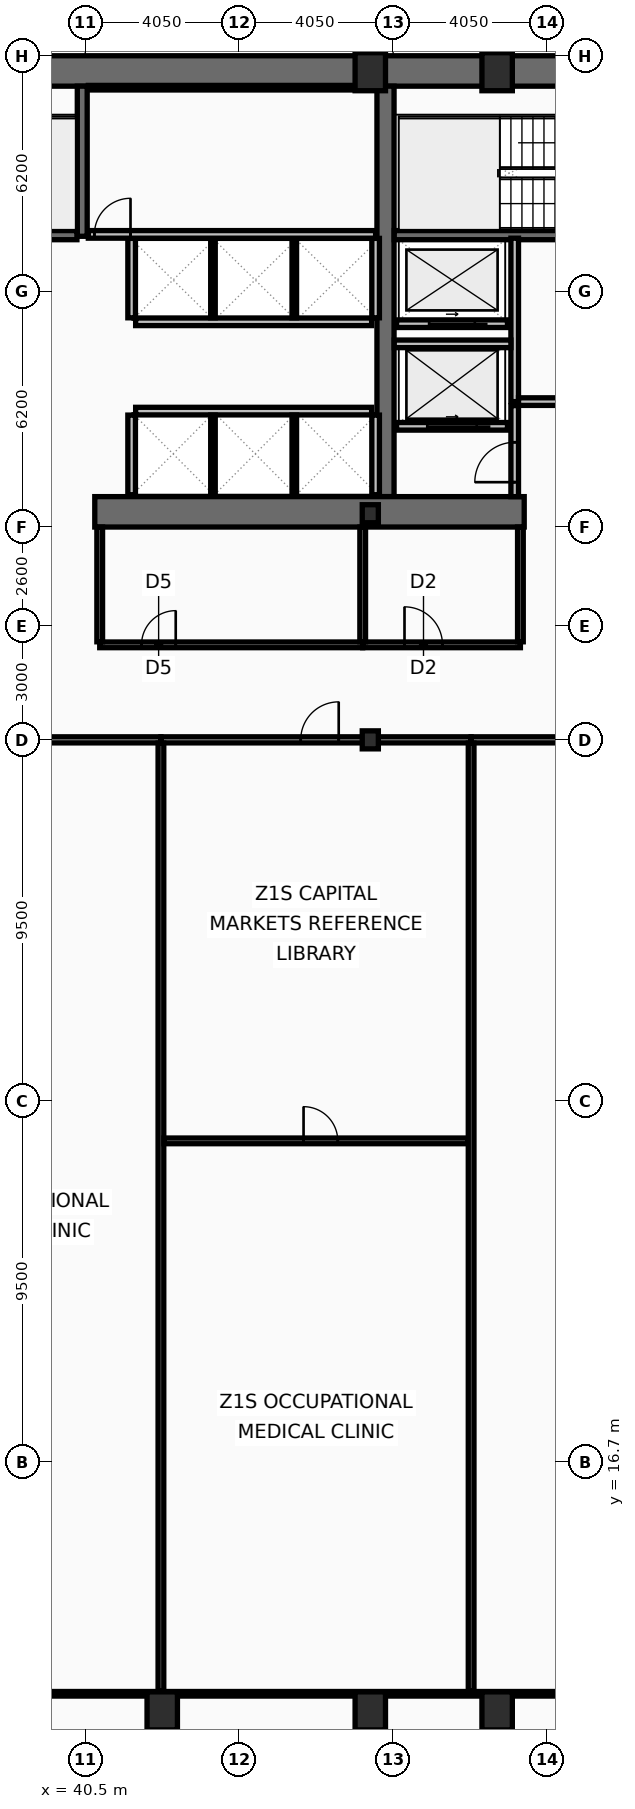
"""IFC4 building model, lengths in metres.
Left out: names, types, materials, properties, quantities, classifications, styles, units other than length and angle.
Written with IfcOpenShell. Run it as: python <this file> out.ifc"""

import sys

from ifc_helpers import new_model, si_unit, direction, frame, frame_2d, origin, origin_2d, place, context, subcontext, project, spatial, rectangle, hollow_rectangle, i_section, extrude, element, fill, save


model = new_model("IFC4")
c1 = context("Model", 3, precision=1e-05, world=origin(), true_north=direction((0.0, 1.0)))
c2 = subcontext(c1, "Body", "Model", "MODEL_VIEW")
j1 = project(units=[si_unit("LENGTHUNIT", "METRE"), si_unit("PLANEANGLEUNIT", "RADIAN")], contexts=[c1])
p1 = place(None, origin())
s1 = spatial("IfcSite", under=j1, at=p1, CompositionType="ELEMENT")
p2 = place(p1, origin())
s2 = spatial("IfcBuilding", under=s1, at=p2, CompositionType="ELEMENT")
p3 = place(p2, frame((0.0, 0.0, 65.8)))
s3 = spatial("IfcBuildingStorey", under=s2, at=p3, CompositionType="ELEMENT", Elevation=65.8)
p4 = place(p3, frame((16.2, 53.3, 0.0), z_axis=(0.0, 0.0, 1.0), x_axis=(1.0, 0.0, 0.0)))
e1 = element("IfcWall", 1, at=p4, inside=s3, PredefinedType="SHEAR", context=c2, shape_type="SweptSolid", body=[
    extrude(rectangle(XDim=40.5, YDim=0.8, at=frame_2d((20.25, 0.0))), origin(), (0.0, 0.0, 1.0), 3.82),
])
p5 = place(p3, frame((48.4, 42.1, 0.0), z_axis=(0.0, 0.0, 1.0), x_axis=(0.0, 1.0, 0.0)))
e2 = element("IfcWall", 2, at=p5, inside=s3, PredefinedType="SHEAR", context=c2, shape_type="SweptSolid", body=[
    extrude(rectangle(XDim=10.8, YDim=0.45, at=frame_2d((5.4, 0.0))), origin(), (0.0, 0.0, 1.0), 3.82),
])
p6 = place(p3, frame((52.05, 41.7, 0.0), z_axis=(0.0, 0.0, 1.0), x_axis=(-1.0, 0.0, 0.0)))
e3 = element("IfcWall", 3, at=p6, inside=s3, PredefinedType="SHEAR", context=c2, shape_type="SweptSolid", body=[
    extrude(rectangle(XDim=11.3, YDim=0.8, at=frame_2d((5.65, 0.0))), origin(), (0.0, 0.0, 1.0), 3.82),
])
p7 = place(p3, frame((40.42, 48.95, 0.0), z_axis=(0.0, 0.0, 1.0), x_axis=(0.0, 1.0, 0.0)))
e4 = element("IfcWall", 4, at=p7, inside=s3, PredefinedType="SHEAR", context=c2, shape_type="SweptSolid", body=[
    extrude(rectangle(XDim=3.95, YDim=0.26, at=frame_2d((1.975, 0.0))), origin(), (0.0, 0.0, 1.0), 3.82),
])
p8 = place(p3, frame((48.63, 48.98, 0.0), z_axis=(0.0, 0.0, 1.0), x_axis=(1.0, 0.0, 0.0)))
e5 = element("IfcWall", 5, at=p8, inside=s3, PredefinedType="SHEAR", context=c2, shape_type="SweptSolid", body=[
    extrude(rectangle(XDim=7.27, YDim=0.24, at=frame_2d((3.635, 0.0))), origin(), (0.0, 0.0, 1.0), 3.82),
])
p9 = place(p8, frame((6.0, 0.0, 0.0)))
e6 = element("IfcOpeningElement", 6, at=p9, cuts=e5, PredefinedType="OPENING", context=c2, shape_type="SweptSolid", body=[
    extrude(rectangle(XDim=1.05, YDim=2.15, at=frame_2d((0.525, 1.075))), frame((0.0, 0.13, 0.0), z_axis=(0.0, -1.0, 0.0), x_axis=(1.0, 0.0, 0.0)), (0.0, 0.0, 1.0), 0.26),
])
p10 = place(p3, frame((32.72, 48.98, 0.0), z_axis=(0.0, 0.0, 1.0), x_axis=(1.0, 0.0, 0.0)))
e7 = element("IfcWall", 7, at=p10, inside=s3, PredefinedType="SHEAR", context=c2, shape_type="SweptSolid", body=[
    extrude(rectangle(XDim=7.56, YDim=0.24, at=frame_2d((3.78, 0.0))), origin(), (0.0, 0.0, 1.0), 3.82),
])
p11 = place(p10, frame((0.22, 0.0, 0.0)))
e8 = element("IfcOpeningElement", 8, at=p11, cuts=e7, PredefinedType="OPENING", context=c2, shape_type="SweptSolid", body=[
    extrude(rectangle(XDim=1.05, YDim=2.15, at=frame_2d((0.525, 1.075))), frame((0.0, 0.13, 0.0), z_axis=(0.0, -1.0, 0.0), x_axis=(1.0, 0.0, 0.0)), (0.0, 0.0, 1.0), 0.26),
])
for number, where, z_axis, x_axis in (
    (9, (42.525, 10.15, 0.0), (0.0, 0.0, 1.0), (1.0, 0.0, 0.0)),
    (10, (48.0, 10.15, 0.0), (0.0, 0.0, 1.0), (1.0, 0.0, 0.0)),
    (11, (51.337, 10.15, 0.0), (0.0, 0.0, 1.0), (1.0, 0.0, 0.0)),
    (12, (48.0, 53.28, 0.0), (0.0, 0.0, 1.0), (1.0, 0.0, 0.0)),
    (13, (51.337, 53.28, 0.0), (0.0, 0.0, 1.0), (1.0, 0.0, 0.0)),
):
    element("IfcColumn", number, at=place(p3, frame(where, z_axis=z_axis, x_axis=x_axis)), inside=s3, PredefinedType="COLUMN", context=c2, shape_type="SweptSolid", body=[
        extrude(hollow_rectangle(XDim=0.8, YDim=1.0, WallThickness=0.055, at=origin_2d()), origin(), (0.0, 0.0, 1.0), 4.0),
    ])
for number, where, z_axis, x_axis in (
    (14, (48.0, 35.7, 0.0), (0.0, 0.0, 1.0), (1.0, 0.0, 0.0)),
    (15, (48.0, 41.65, 0.0), (0.0, 0.0, 1.0), (1.0, 0.0, 0.0)),
):
    element("IfcColumn", number, at=place(p3, frame(where, z_axis=z_axis, x_axis=x_axis)), inside=s3, PredefinedType="COLUMN", context=c2, shape_type="SweptSolid", body=[
        extrude(i_section(OverallWidth=0.424, OverallDepth=0.474, WebThickness=0.048, FlangeThickness=0.077, at=origin_2d()), origin(), (0.0, 0.0, 1.0), 4.0),
    ])
p12 = place(p3, frame((51.61, 43.95, 0.0), z_axis=(0.0, 0.0, 1.0), x_axis=(-1.0, 0.0, 0.0)))
e16 = element("IfcWall", 16, at=p12, inside=s3, PredefinedType="PARTITIONING", context=c2, shape_type="SweptSolid", body=[
    extrude(rectangle(XDim=2.92, YDim=0.2, at=frame_2d((1.46, 0.0))), origin(), (0.0, 0.0, 1.0), 3.82),
])
p13 = place(p12, frame((0.81, 0.0, 0.0)))
e17 = element("IfcOpeningElement", 17, at=p13, cuts=e16, PredefinedType="OPENING", context=c2, shape_type="SweptSolid", body=[
    extrude(rectangle(XDim=1.3, YDim=2.18, at=frame_2d((0.65, 1.09))), frame((0.0, 0.11, 0.0), z_axis=(0.0, -1.0, 0.0), x_axis=(1.0, 0.0, 0.0)), (0.0, 0.0, 1.0), 0.22),
])
p14 = place(p3, frame((51.61, 46.65, 0.0), z_axis=(0.0, 0.0, 1.0), x_axis=(-1.0, 0.0, 0.0)))
e18 = element("IfcWall", 18, at=p14, inside=s3, PredefinedType="PARTITIONING", context=c2, shape_type="SweptSolid", body=[
    extrude(rectangle(XDim=2.92, YDim=0.2, at=frame_2d((1.46, 0.0))), origin(), (0.0, 0.0, 1.0), 3.82),
])
p15 = place(p14, frame((0.86, 0.0, 0.0)))
e19 = element("IfcOpeningElement", 19, at=p15, cuts=e18, PredefinedType="OPENING", context=c2, shape_type="SweptSolid", body=[
    extrude(rectangle(XDim=1.2, YDim=2.18, at=frame_2d((0.6, 1.09))), frame((0.0, 0.11, 0.0), z_axis=(0.0, -1.0, 0.0), x_axis=(1.0, 0.0, 0.0)), (0.0, 0.0, 1.0), 0.22),
])
p16 = place(p3, frame((51.8, 44.6, 0.0), z_axis=(0.0, 0.0, 1.0), x_axis=(0.0, 1.0, 0.0)))
e20 = element("IfcWall", 20, at=p16, inside=s3, PredefinedType="PARTITIONING", context=c2, shape_type="SweptSolid", body=[
    extrude(rectangle(XDim=4.3, YDim=0.2, at=frame_2d((2.15, 0.0))), origin(), (0.0, 0.0, 1.0), 3.82),
])
p17 = place(p3, frame((51.9, 44.6, 0.0), z_axis=(0.0, 0.0, 1.0), x_axis=(1.0, 0.0, 0.0)))
e21 = element("IfcWall", 21, at=p17, inside=s3, PredefinedType="PARTITIONING", context=c2, shape_type="SweptSolid", body=[
    extrude(rectangle(XDim=4.0, YDim=0.2, at=frame_2d((2.0, 0.0))), origin(), (0.0, 0.0, 1.0), 3.82),
])
p18 = place(p17, frame((1.15, 0.0, 0.0)))
e22 = element("IfcOpeningElement", 22, at=p18, cuts=e21, PredefinedType="OPENING", context=c2, shape_type="SweptSolid", body=[
    extrude(rectangle(XDim=1.05, YDim=2.15, at=frame_2d((0.525, 1.075))), frame((0.0, 0.11, 0.0), z_axis=(0.0, -1.0, 0.0), x_axis=(1.0, 0.0, 0.0)), (0.0, 0.0, 1.0), 0.22),
])
p19 = place(p3, frame((48.63, 46.12, 0.0), z_axis=(0.0, 0.0, 1.0), x_axis=(1.0, 0.0, 0.0)))
e23 = element("IfcWall", 23, at=p19, inside=s3, PredefinedType="PARTITIONING", context=c2, shape_type="SweptSolid", body=[
    extrude(rectangle(XDim=3.07, YDim=0.2, at=frame_2d((1.535, 0.0))), origin(), (0.0, 0.0, 1.0), 3.82),
])
p20 = place(p3, frame((51.8, 42.1, 0.0), z_axis=(0.0, 0.0, 1.0), x_axis=(0.0, 1.0, 0.0)))
e24 = element("IfcWall", 24, at=p20, inside=s3, PredefinedType="PARTITIONING", context=c2, shape_type="SweptSolid", body=[
    extrude(rectangle(XDim=2.395, YDim=0.2, at=frame_2d((1.198, 0.0))), origin(), (0.0, 0.0, 1.0), 3.82),
])
p21 = place(p20, frame((0.38, 0.0, 0.0)))
e25 = element("IfcOpeningElement", 25, at=p21, cuts=e24, PredefinedType="OPENING", context=c2, shape_type="SweptSolid", body=[
    extrude(rectangle(XDim=1.05, YDim=2.15, at=frame_2d((0.525, 1.075))), frame((0.0, 0.11, 0.0), z_axis=(0.0, -1.0, 0.0), x_axis=(1.0, 0.0, 0.0)), (0.0, 0.0, 1.0), 0.22),
])
p22 = place(p3, frame((41.825, 46.7, 0.0), z_axis=(0.0, 0.0, 1.0), x_axis=(1.0, 0.0, 0.0)))
e26 = element("IfcWall", 26, at=p22, inside=s3, PredefinedType="PARTITIONING", context=c2, shape_type="SweptSolid", body=[
    extrude(rectangle(XDim=6.21, YDim=0.2, at=frame_2d((3.105, 0.0))), origin(), (0.0, 0.0, 1.0), 3.82),
])
for number, where, z_axis, x_axis in (
    (27, (41.72, 46.805, 0.0), (0.0, 0.0, 1.0), (0.0, 1.0, 0.0)),
    (28, (48.14, 46.805, 0.0), (0.0, 0.0, 1.0), (0.0, 1.0, 0.0)),
):
    element("IfcWall", number, at=place(p3, frame(where, z_axis=z_axis, x_axis=x_axis)), inside=s3, PredefinedType="PARTITIONING", context=c2, shape_type="SweptSolid", body=[
        extrude(rectangle(XDim=2.09, YDim=0.2, at=frame_2d((1.045, 0.0))), origin(), (0.0, 0.0, 1.0), 3.82),
    ])
for number, where, z_axis, x_axis in (
    (29, (43.86, 46.805, 0.0), (0.0, 0.0, 1.0), (0.0, 1.0, 0.0)),
    (30, (46.0, 46.805, 0.0), (0.0, 0.0, 1.0), (0.0, 1.0, 0.0)),
):
    element("IfcWall", number, at=place(p3, frame(where, z_axis=z_axis, x_axis=x_axis)), inside=s3, PredefinedType="PARTITIONING", context=c2, shape_type="SweptSolid", body=[
        extrude(rectangle(XDim=2.09, YDim=0.12, at=frame_2d((1.045, 0.0))), origin(), (0.0, 0.0, 1.0), 3.82),
    ])
p23 = place(p3, frame((41.825, 44.35, 0.0), z_axis=(0.0, 0.0, 1.0), x_axis=(1.0, 0.0, 0.0)))
e31 = element("IfcWall", 31, at=p23, inside=s3, PredefinedType="PARTITIONING", context=c2, shape_type="SweptSolid", body=[
    extrude(rectangle(XDim=6.21, YDim=0.2, at=frame_2d((3.105, 0.0))), origin(), (0.0, 0.0, 1.0), 3.82),
])
for number, where, z_axis, x_axis in (
    (32, (41.72, 42.15, 0.0), (0.0, 0.0, 1.0), (0.0, 1.0, 0.0)),
    (33, (48.14, 42.15, 0.0), (0.0, 0.0, 1.0), (0.0, 1.0, 0.0)),
):
    element("IfcWall", number, at=place(p3, frame(where, z_axis=z_axis, x_axis=x_axis)), inside=s3, PredefinedType="PARTITIONING", context=c2, shape_type="SweptSolid", body=[
        extrude(rectangle(XDim=2.095, YDim=0.2, at=frame_2d((1.048, 0.0))), origin(), (0.0, 0.0, 1.0), 3.82),
    ])
for number, where, z_axis, x_axis in (
    (34, (43.86, 42.15, 0.0), (0.0, 0.0, 1.0), (0.0, 1.0, 0.0)),
    (35, (46.0, 42.15, 0.0), (0.0, 0.0, 1.0), (0.0, 1.0, 0.0)),
):
    element("IfcWall", number, at=place(p3, frame(where, z_axis=z_axis, x_axis=x_axis)), inside=s3, PredefinedType="PARTITIONING", context=c2, shape_type="SweptSolid", body=[
        extrude(rectangle(XDim=2.095, YDim=0.12, at=frame_2d((1.048, 0.0))), origin(), (0.0, 0.0, 1.0), 3.82),
    ])
p24 = place(p3, frame((40.58, 52.86, 0.0), z_axis=(0.0, 0.0, 1.0), x_axis=(1.0, 0.0, 0.0)))
e36 = element("IfcWall", 36, at=p24, inside=s3, PredefinedType="PARTITIONING", context=c2, shape_type="SweptSolid", body=[
    extrude(rectangle(XDim=7.56, YDim=0.12, at=frame_2d((3.78, 0.0))), origin(), (0.0, 0.0, 1.0), 3.82),
])
p25 = place(p3, frame((40.58, 49.0, 0.0), z_axis=(0.0, 0.0, 1.0), x_axis=(1.0, 0.0, 0.0)))
e37 = element("IfcWall", 37, at=p25, inside=s3, PredefinedType="PARTITIONING", context=c2, shape_type="SweptSolid", body=[
    extrude(rectangle(XDim=7.56, YDim=0.2, at=frame_2d((3.78, 0.0))), origin(), (0.0, 0.0, 1.0), 3.82),
])
p26 = place(p25, frame((0.16, 0.0, 0.0)))
e38 = element("IfcOpeningElement", 38, at=p26, cuts=e37, PredefinedType="OPENING", context=c2, shape_type="SweptSolid", body=[
    extrude(rectangle(XDim=0.95, YDim=2.1, at=frame_2d((0.475, 1.05))), frame((0.0, 0.11, 0.0), z_axis=(0.0, -1.0, 0.0), x_axis=(1.0, 0.0, 0.0)), (0.0, 0.0, 1.0), 0.22),
])
p27 = place(p3, frame((40.88, 38.2, 0.0), z_axis=(0.0, 0.0, 1.0), x_axis=(1.0, 0.0, 0.0)))
e39 = element("IfcWall", 39, at=p27, inside=s3, PredefinedType="PARTITIONING", context=c2, shape_type="SweptSolid", body=[
    extrude(rectangle(XDim=6.92, YDim=0.15, at=frame_2d((3.46, 0.0))), origin(), (0.0, 0.0, 1.0), 3.01),
])
p28 = place(p27, frame((1.1, 0.0, 0.0)))
e40 = element("IfcOpeningElement", 40, at=p28, cuts=e39, PredefinedType="OPENING", context=c2, shape_type="SweptSolid", body=[
    extrude(rectangle(XDim=0.9, YDim=2.05, at=frame_2d((0.45, 1.025))), frame((0.0, 0.085, 0.0), z_axis=(0.0, -1.0, 0.0), x_axis=(1.0, 0.0, 0.0)), (0.0, 0.0, 1.0), 0.17),
])
p29 = place(p3, frame((47.8, 38.2, 0.0), z_axis=(0.0, 0.0, 1.0), x_axis=(1.0, 0.0, 0.0)))
e41 = element("IfcWall", 41, at=p29, inside=s3, PredefinedType="PARTITIONING", context=c2, shape_type="SweptSolid", body=[
    extrude(rectangle(XDim=4.15, YDim=0.15, at=frame_2d((2.075, 0.0))), origin(), (0.0, 0.0, 1.0), 3.01),
])
p30 = place(p29, frame((1.1, 0.0, 0.0)))
e42 = element("IfcOpeningElement", 42, at=p30, cuts=e41, PredefinedType="OPENING", context=c2, shape_type="SweptSolid", body=[
    extrude(rectangle(XDim=1.0, YDim=2.05, at=frame_2d((0.5, 1.025))), frame((0.0, 0.085, 0.0), z_axis=(0.0, -1.0, 0.0), x_axis=(1.0, 0.0, 0.0)), (0.0, 0.0, 1.0), 0.17),
])
p31 = place(p3, frame((40.88, 38.28, 0.0), z_axis=(0.0, 0.0, 1.0), x_axis=(0.0, 1.0, 0.0)))
e43 = element("IfcWall", 43, at=p31, inside=s3, PredefinedType="PARTITIONING", context=c2, shape_type="SweptSolid", body=[
    extrude(rectangle(XDim=3.02, YDim=0.15, at=frame_2d((1.51, 0.0))), origin(), (0.0, 0.0, 1.0), 3.82),
])
p32 = place(p3, frame((47.8, 38.28, 0.0), z_axis=(0.0, 0.0, 1.0), x_axis=(0.0, 1.0, 0.0)))
e44 = element("IfcWall", 44, at=p32, inside=s3, PredefinedType="PARTITIONING", context=c2, shape_type="SweptSolid", body=[
    extrude(rectangle(XDim=3.02, YDim=0.15, at=frame_2d((1.51, 0.0))), origin(), (0.0, 0.0, 1.0), 3.01),
])
p33 = place(p3, frame((51.95, 38.28, 0.0), z_axis=(0.0, 0.0, 1.0), x_axis=(0.0, 1.0, 0.0)))
e45 = element("IfcWall", 45, at=p33, inside=s3, PredefinedType="PARTITIONING", context=c2, shape_type="SweptSolid", body=[
    extrude(rectangle(XDim=3.02, YDim=0.15, at=frame_2d((1.51, 0.0))), origin(), (0.0, 0.0, 1.0), 3.82),
])
p34 = place(p3, frame((34.68, 35.7, 0.0), z_axis=(0.0, 0.0, 1.0), x_axis=(1.0, 0.0, 0.0)))
e46 = element("IfcWall", 46, at=p34, inside=s3, PredefinedType="PARTITIONING", context=c2, shape_type="SweptSolid", body=[
    extrude(rectangle(XDim=7.81, YDim=0.16, at=frame_2d((3.905, 0.0))), origin(), (0.0, 0.0, 1.0), 3.01),
])
p35 = place(p34, frame((3.53, 0.0, 0.0)))
e47 = element("IfcOpeningElement", 47, at=p35, cuts=e46, PredefinedType="OPENING", context=c2, shape_type="SweptSolid", body=[
    extrude(rectangle(XDim=1.0, YDim=2.05, at=frame_2d((0.5, 1.025))), frame((0.0, 0.09, 0.0), z_axis=(0.0, -1.0, 0.0), x_axis=(1.0, 0.0, 0.0)), (0.0, 0.0, 1.0), 0.18),
])
p36 = place(p3, frame((42.49, 35.7, 0.0), z_axis=(0.0, 0.0, 1.0), x_axis=(1.0, 0.0, 0.0)))
e48 = element("IfcWall", 48, at=p36, inside=s3, PredefinedType="PARTITIONING", context=c2, shape_type="SweptSolid", body=[
    extrude(rectangle(XDim=8.163, YDim=0.16, at=frame_2d((4.082, 0.0))), origin(), (0.0, 0.0, 1.0), 3.01),
])
p37 = place(p36, frame((3.678, 0.0, 0.0)))
e49 = element("IfcOpeningElement", 49, at=p37, cuts=e48, PredefinedType="OPENING", context=c2, shape_type="SweptSolid", body=[
    extrude(rectangle(XDim=1.0, YDim=2.05, at=frame_2d((0.5, 1.025))), frame((0.0, 0.09, 0.0), z_axis=(0.0, -1.0, 0.0), x_axis=(1.0, 0.0, 0.0)), (0.0, 0.0, 1.0), 0.18),
])
p38 = place(p3, frame((42.49, 10.665, 0.0), z_axis=(0.0, 0.0, 1.0), x_axis=(0.0, 1.0, 0.0)))
e50 = element("IfcWall", 50, at=p38, inside=s3, PredefinedType="PARTITIONING", context=c2, shape_type="SweptSolid", body=[
    extrude(rectangle(XDim=24.95, YDim=0.15, at=frame_2d((12.475, 0.0))), origin(), (0.0, 0.0, 1.0), 3.01),
])
p39 = place(p3, frame((42.571, 25.148, 0.0), z_axis=(0.0, 0.0, 1.0), x_axis=(1.0, 0.0, 0.0)))
e51 = element("IfcWall", 51, at=p39, inside=s3, PredefinedType="PARTITIONING", context=c2, shape_type="SweptSolid", body=[
    extrude(rectangle(XDim=8.003, YDim=0.15, at=frame_2d((4.001, 0.0))), origin(), (0.0, 0.0, 1.0), 3.01),
])
p40 = place(p39, frame((3.673, 0.0, 0.0)))
e52 = element("IfcOpeningElement", 52, at=p40, cuts=e51, PredefinedType="OPENING", context=c2, shape_type="SweptSolid", body=[
    extrude(rectangle(XDim=0.9, YDim=2.05, at=frame_2d((0.45, 1.025))), frame((0.0, 0.085, 0.0), z_axis=(0.0, -1.0, 0.0), x_axis=(1.0, 0.0, 0.0)), (0.0, 0.0, 1.0), 0.17),
])
p41 = place(p3, frame((50.653, 35.7, 0.0), z_axis=(0.0, 0.0, 1.0), x_axis=(1.0, 0.0, 0.0)))
e53 = element("IfcWall", 53, at=p41, inside=s3, PredefinedType="PARTITIONING", context=c2, shape_type="SweptSolid", body=[
    extrude(rectangle(XDim=10.169, YDim=0.16, at=frame_2d((5.084, 0.0))), origin(), (0.0, 0.0, 1.0), 3.01),
])
p42 = place(p41, frame((4.521, 0.0, 0.0)))
e54 = element("IfcOpeningElement", 54, at=p42, cuts=e53, PredefinedType="OPENING", context=c2, shape_type="SweptSolid", body=[
    extrude(rectangle(XDim=1.0, YDim=2.05, at=frame_2d((0.5, 1.025))), frame((0.0, 0.09, 0.0), z_axis=(0.0, -1.0, 0.0), x_axis=(1.0, 0.0, 0.0)), (0.0, 0.0, 1.0), 0.18),
])
p43 = place(p3, frame((50.653, 10.665, 0.0), z_axis=(0.0, 0.0, 1.0), x_axis=(0.0, 1.0, 0.0)))
e55 = element("IfcWall", 55, at=p43, inside=s3, PredefinedType="PARTITIONING", context=c2, shape_type="SweptSolid", body=[
    extrude(rectangle(XDim=24.95, YDim=0.15, at=frame_2d((12.475, 0.0))), origin(), (0.0, 0.0, 1.0), 3.21),
])
p44 = place(p3, frame((2.095, 10.6, 0.0), z_axis=(0.0, 0.0, 1.0), x_axis=(1.0, 0.0, 0.0)))
e56 = element("IfcWall", 56, at=p44, inside=s3, PredefinedType="PARTITIONING", context=c2, shape_type="SweptSolid", body=[
    extrude(rectangle(XDim=68.71, YDim=0.12, at=frame_2d((34.355, 0.0))), origin(), (0.0, 0.0, 1.0), 3.01),
])
p45 = place(p13, origin())
e57 = element("IfcDoor", 57, at=p45, inside=s3, OperationType="SLIDING_TO_LEFT", PredefinedType="DOOR", context=c2, shape_type="SweptSolid", body=[
    extrude(rectangle(XDim=1.3, YDim=2.18, at=frame_2d((0.65, 1.09))), frame((0.0, 0.025, 0.0), z_axis=(0.0, -1.0, 0.0), x_axis=(1.0, 0.0, 0.0)), (0.0, 0.0, 1.0), 0.05),
])
fill(e17, e57)
p46 = place(p15, origin())
e58 = element("IfcDoor", 58, at=p46, inside=s3, OperationType="SLIDING_TO_LEFT", PredefinedType="DOOR", context=c2, shape_type="SweptSolid", body=[
    extrude(rectangle(XDim=1.2, YDim=2.18, at=frame_2d((0.6, 1.09))), frame((0.0, 0.025, 0.0), z_axis=(0.0, -1.0, 0.0), x_axis=(1.0, 0.0, 0.0)), (0.0, 0.0, 1.0), 0.05),
])
fill(e19, e58)
p47 = place(p21, origin())
e59 = element("IfcDoor", 59, at=p47, inside=s3, OperationType="SINGLE_SWING_LEFT", PredefinedType="DOOR", context=c2, shape_type="SweptSolid", body=[
    extrude(rectangle(XDim=1.05, YDim=2.15, at=frame_2d((0.525, 1.075))), frame((0.0, 0.025, 0.0), z_axis=(0.0, -1.0, 0.0), x_axis=(1.0, 0.0, 0.0)), (0.0, 0.0, 1.0), 0.05),
])
fill(e25, e59)
p48 = place(p26, origin())
e60 = element("IfcDoor", 60, at=p48, inside=s3, OperationType="SINGLE_SWING_RIGHT", PredefinedType="DOOR", context=c2, shape_type="SweptSolid", body=[
    extrude(rectangle(XDim=0.95, YDim=2.1, at=frame_2d((0.475, 1.05))), frame((0.0, 0.025, 0.0), z_axis=(0.0, -1.0, 0.0), x_axis=(1.0, 0.0, 0.0)), (0.0, 0.0, 1.0), 0.05),
])
fill(e38, e60)
p49 = place(p28, origin())
e61 = element("IfcDoor", 61, at=p49, inside=s3, OperationType="SINGLE_SWING_RIGHT", PredefinedType="DOOR", context=c2, shape_type="SweptSolid", body=[
    extrude(rectangle(XDim=0.9, YDim=2.05, at=frame_2d((0.45, 1.025))), frame((0.0, 0.025, 0.0), z_axis=(0.0, -1.0, 0.0), x_axis=(1.0, 0.0, 0.0)), (0.0, 0.0, 1.0), 0.05),
])
fill(e40, e61)
p50 = place(p30, origin())
e62 = element("IfcDoor", 62, at=p50, inside=s3, OperationType="SINGLE_SWING_LEFT", PredefinedType="DOOR", context=c2, shape_type="SweptSolid", body=[
    extrude(rectangle(XDim=1.0, YDim=2.05, at=frame_2d((0.5, 1.025))), frame((0.0, 0.025, 0.0), z_axis=(0.0, -1.0, 0.0), x_axis=(1.0, 0.0, 0.0)), (0.0, 0.0, 1.0), 0.05),
])
fill(e42, e62)
p51 = place(p37, origin())
e63 = element("IfcDoor", 63, at=p51, inside=s3, OperationType="SINGLE_SWING_RIGHT", PredefinedType="DOOR", context=c2, shape_type="SweptSolid", body=[
    extrude(rectangle(XDim=1.0, YDim=2.05, at=frame_2d((0.5, 1.025))), frame((0.0, 0.025, 0.0), z_axis=(0.0, -1.0, 0.0), x_axis=(1.0, 0.0, 0.0)), (0.0, 0.0, 1.0), 0.05),
])
fill(e49, e63)
p52 = place(p40, origin())
e64 = element("IfcDoor", 64, at=p52, inside=s3, OperationType="SINGLE_SWING_LEFT", PredefinedType="DOOR", context=c2, shape_type="SweptSolid", body=[
    extrude(rectangle(XDim=0.9, YDim=2.05, at=frame_2d((0.45, 1.025))), frame((0.0, 0.025, 0.0), z_axis=(0.0, -1.0, 0.0), x_axis=(1.0, 0.0, 0.0)), (0.0, 0.0, 1.0), 0.05),
])
fill(e52, e64)
save(model, sys.argv[1])
